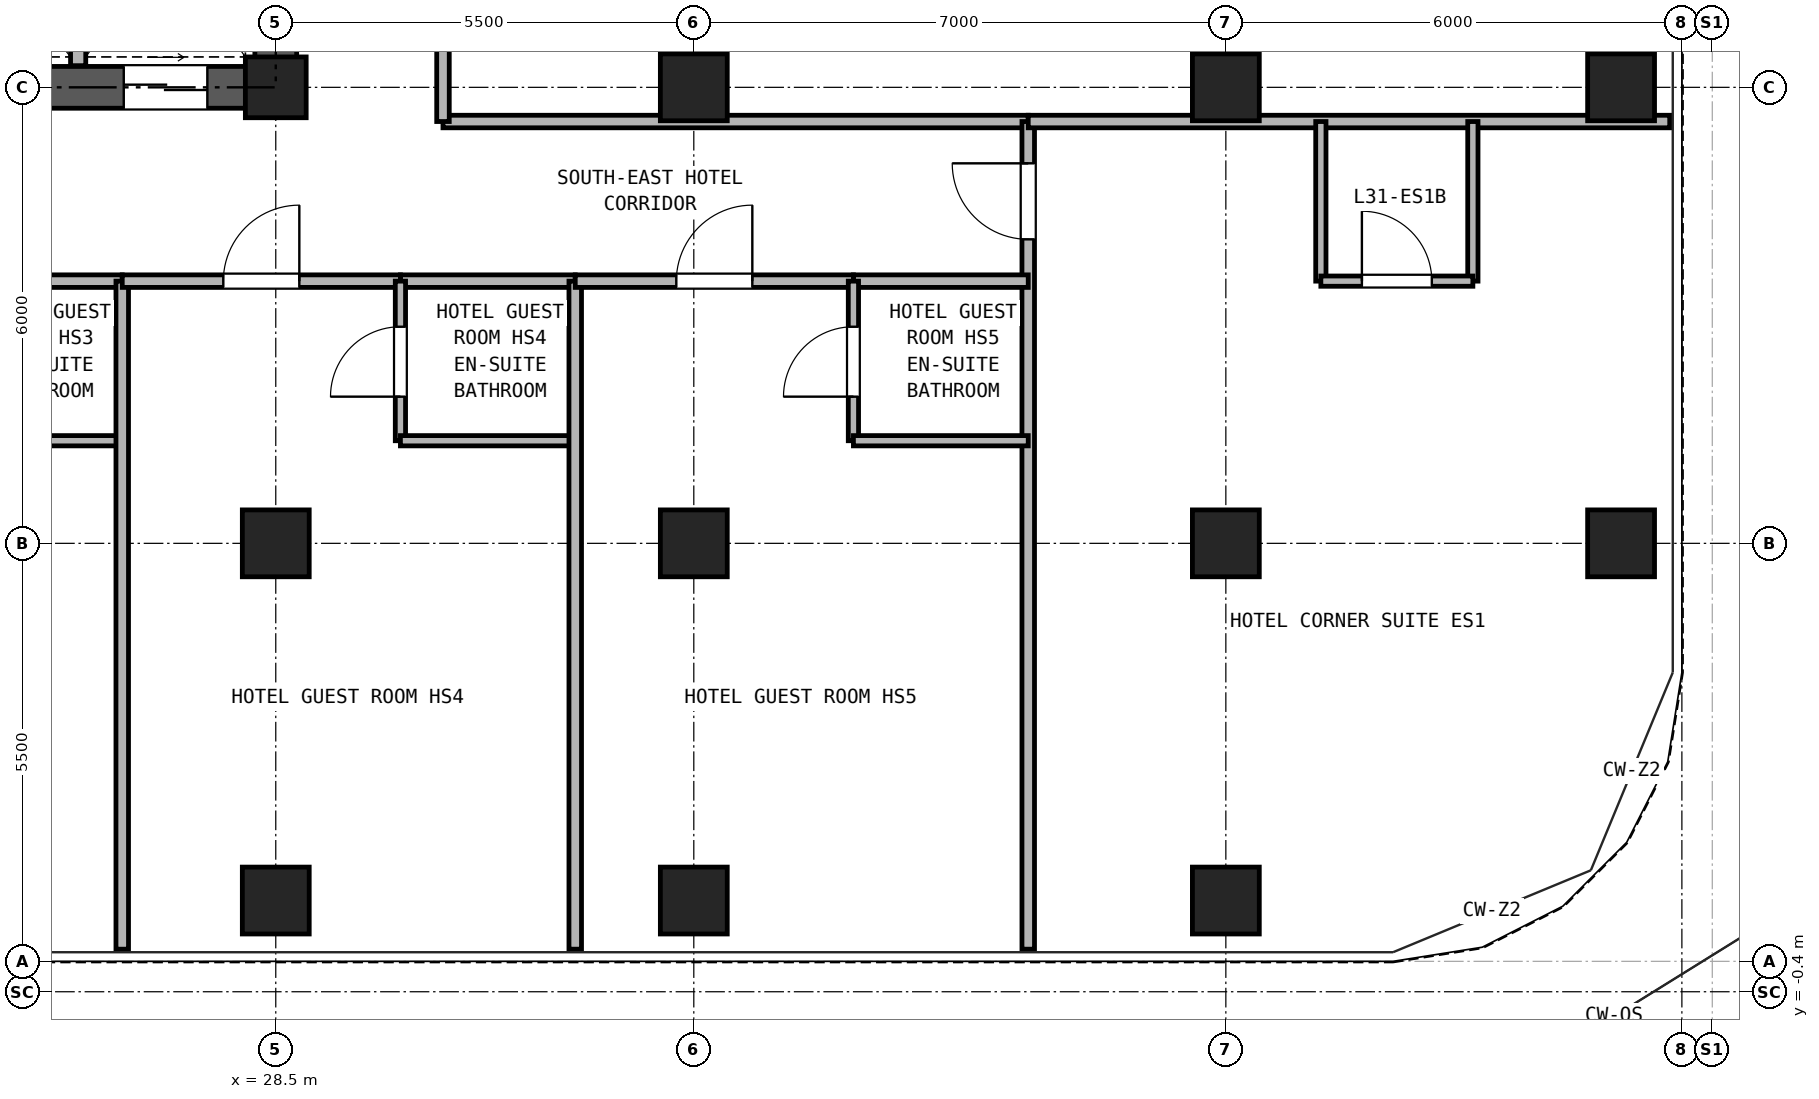
"""IFC4 building model, lengths in metres.
Left out: names, types, materials, properties, quantities, classifications, styles, units other than length and angle.
Written with IfcOpenShell. Run it as: python <this file> out.ifc"""

import sys

from ifc_helpers import new_model, si_unit, direction, frame, frame_2d, origin, origin_2d, place, context, subcontext, project, spatial, rectangle, hollow_rectangle, extrude, source, transform, mapped, element, fill, save


model = new_model("IFC4")
c1 = context("Model", 3, precision=1e-05, world=origin(), true_north=direction((0.0, 1.0)))
c2 = subcontext(c1, "Body", "Model", "MODEL_VIEW")
j1 = project(units=[si_unit("LENGTHUNIT", "METRE"), si_unit("PLANEANGLEUNIT", "RADIAN")], contexts=[c1])
p1 = place(None, origin())
s1 = spatial("IfcSite", under=j1, at=p1, CompositionType="ELEMENT")
p2 = place(p1, origin())
s2 = spatial("IfcBuilding", under=s1, at=p2, CompositionType="ELEMENT")
p3 = place(p2, frame((0.0, 0.0, 115.1)))
s3 = spatial("IfcBuildingStorey", under=s2, at=p3, CompositionType="ELEMENT", Elevation=115.1)
m1 = source(origin(), c2, "Body", "SweptSolid", [
    extrude(hollow_rectangle(XDim=0.88, YDim=0.88, WallThickness=0.05, at=origin_2d()), origin(), (0.0, 0.0, 1.0), 2.95),
])
for number, where, z_axis, x_axis in (
    (1, (28.5, 0.8, 0.0), (0.0, 0.0, 1.0), (1.0, 0.0, 0.0)),
    (2, (34.0, 0.8, 0.0), (0.0, 0.0, 1.0), (1.0, 0.0, 0.0)),
    (3, (41.0, 0.8, 0.0), (0.0, 0.0, 1.0), (1.0, 0.0, 0.0)),
    (4, (46.2, 5.5, 0.0), (0.0, 0.0, 1.0), (1.0, 0.0, 0.0)),
    (5, (46.2, 11.5, 0.0), (0.0, 0.0, 1.0), (1.0, 0.0, 0.0)),
    (6, (28.5, 5.5, 0.0), (0.0, 0.0, 1.0), (1.0, 0.0, 0.0)),
):
    element("IfcColumn", number, at=place(p3, frame(where, z_axis=z_axis, x_axis=x_axis)), inside=s3, PredefinedType="COLUMN", context=c2, shape_type="MappedRepresentation", body=[
        mapped(m1, transform((0.0, 0.0, 0.0), x_axis=(1.0, 0.0, 0.0), y_axis=(0.0, 1.0, 0.0), z_axis=(0.0, 0.0, 1.0), scale=1.0)),
    ])
m2 = source(origin(), c2, "Body", "SweptSolid", [
    extrude(hollow_rectangle(XDim=0.8, YDim=0.8, WallThickness=0.045, at=origin_2d()), origin(), (0.0, 0.0, 1.0), 2.95),
])
p4 = place(p3, frame((28.5, 11.5, 0.0), z_axis=(0.0, 0.0, 1.0), x_axis=(1.0, 0.0, 0.0)))
e7 = element("IfcColumn", 7, at=p4, inside=s3, PredefinedType="COLUMN", context=c2, shape_type="MappedRepresentation", body=[
    mapped(m2, transform((0.0, 0.0, 0.0), x_axis=(1.0, 0.0, 0.0), y_axis=(0.0, 1.0, 0.0), z_axis=(0.0, 0.0, 1.0), scale=1.0)),
])
for number, where, z_axis, x_axis in (
    (8, (34.0, 5.5, 0.0), (0.0, 0.0, 1.0), (1.0, 0.0, 0.0)),
    (9, (34.0, 11.5, 0.0), (0.0, 0.0, 1.0), (1.0, 0.0, 0.0)),
    (10, (41.0, 5.5, 0.0), (0.0, 0.0, 1.0), (1.0, 0.0, 0.0)),
    (11, (41.0, 11.5, 0.0), (0.0, 0.0, 1.0), (1.0, 0.0, 0.0)),
):
    element("IfcColumn", number, at=place(p3, frame(where, z_axis=z_axis, x_axis=x_axis)), inside=s3, PredefinedType="COLUMN", context=c2, shape_type="MappedRepresentation", body=[
        mapped(m1, transform((0.0, 0.0, 0.0), x_axis=(1.0, 0.0, 0.0), y_axis=(0.0, 1.0, 0.0), z_axis=(0.0, 0.0, 1.0), scale=1.0)),
    ])
p5 = place(p3, frame((18.225, 11.5, 0.0), z_axis=(0.0, 0.0, 1.0), x_axis=(1.0, 0.0, 0.0)))
e12 = element("IfcWall", 12, at=p5, inside=s3, PredefinedType="SHEAR", context=c2, shape_type="SweptSolid", body=[
    extrude(rectangle(XDim=10.55, YDim=0.55, at=frame_2d((5.275, 0.0))), origin(), (0.0, 0.0, 1.0), 2.95),
])
p6 = place(p5, frame((2.375, 0.0, 0.0)))
e13 = element("IfcOpeningElement", 13, at=p6, cuts=e12, PredefinedType="OPENING", context=c2, shape_type="SweptSolid", body=[
    extrude(rectangle(XDim=0.95, YDim=2.15, at=frame_2d((0.475, 1.075))), frame((0.0, 0.285, 0.0), z_axis=(0.0, -1.0, 0.0), x_axis=(1.0, 0.0, 0.0)), (0.0, 0.0, 1.0), 0.57),
])
p7 = place(p5, frame((5.875, 0.0, 0.0)))
e14 = element("IfcOpeningElement", 14, at=p7, cuts=e12, PredefinedType="OPENING", context=c2, shape_type="SweptSolid", body=[
    extrude(rectangle(XDim=1.1, YDim=2.25, at=frame_2d((0.55, 1.125))), frame((0.0, 0.285, 0.0), z_axis=(0.0, -1.0, 0.0), x_axis=(1.0, 0.0, 0.0)), (0.0, 0.0, 1.0), 0.57),
])
p8 = place(p5, frame((8.275, 0.0, 0.0)))
e15 = element("IfcOpeningElement", 15, at=p8, cuts=e12, PredefinedType="OPENING", context=c2, shape_type="SweptSolid", body=[
    extrude(rectangle(XDim=1.1, YDim=2.25, at=frame_2d((0.55, 1.125))), frame((0.0, 0.285, 0.0), z_axis=(0.0, -1.0, 0.0), x_axis=(1.0, 0.0, 0.0)), (0.0, 0.0, 1.0), 0.57),
])
p9 = place(p3, frame((28.5, 11.775, 0.0), z_axis=(0.0, 0.0, 1.0), x_axis=(0.0, 1.0, 0.0)))
e16 = element("IfcWall", 16, at=p9, inside=s3, PredefinedType="SHEAR", context=c2, shape_type="SweptSolid", body=[
    extrude(rectangle(XDim=16.7, YDim=0.55, at=frame_2d((8.35, 0.0))), origin(), (0.0, 0.0, 1.0), 2.95),
])
p10 = place(p9, frame((7.375, 0.0, 0.0)))
e17 = element("IfcOpeningElement", 17, at=p10, cuts=e16, PredefinedType="OPENING", context=c2, shape_type="SweptSolid", body=[
    extrude(rectangle(XDim=1.15, YDim=2.2, at=frame_2d((0.575, 1.1))), frame((0.0, 0.285, 0.0), z_axis=(0.0, -1.0, 0.0), x_axis=(1.0, 0.0, 0.0)), (0.0, 0.0, 1.0), 0.57),
])
p11 = place(p3, frame((25.9, 11.785, 0.0), z_axis=(0.0, 0.0, 1.0), x_axis=(0.0, 1.0, 0.0)))
e18 = element("IfcWall", 18, at=p11, inside=s3, PredefinedType="PARTITIONING", context=c2, shape_type="SweptSolid", body=[
    extrude(rectangle(XDim=3.215, YDim=0.2, at=frame_2d((1.607, 0.0))), origin(), (0.0, 0.0, 1.0), 2.95),
])
p12 = place(p3, frame((30.7, 11.05, 0.0), z_axis=(0.0, 0.0, 1.0), x_axis=(1.0, 0.0, 0.0)))
e19 = element("IfcWall", 19, at=p12, inside=s3, PredefinedType="PARTITIONING", context=c2, shape_type="SweptSolid", body=[
    extrude(rectangle(XDim=7.7, YDim=0.165, at=frame_2d((3.85, 0.0))), origin(), (0.0, 0.0, 1.0), 2.95),
])
p13 = place(p3, frame((30.7, 11.05, 0.0), z_axis=(0.0, 0.0, 1.0), x_axis=(0.0, 1.0, 0.0)))
e20 = element("IfcWall", 20, at=p13, inside=s3, PredefinedType="PARTITIONING", context=c2, shape_type="SweptSolid", body=[
    extrude(rectangle(XDim=18.15, YDim=0.165, at=frame_2d((9.075, 0.0))), origin(), (0.0, 0.0, 1.0), 2.95),
])
p14 = place(p13, frame((8.575, 0.0, 0.0)))
e21 = element("IfcOpeningElement", 21, at=p14, cuts=e20, PredefinedType="OPENING", context=c2, shape_type="SweptSolid", body=[
    extrude(rectangle(XDim=0.95, YDim=2.15, at=frame_2d((0.475, 1.075))), frame((0.0, 0.093, 0.0), z_axis=(0.0, -1.0, 0.0), x_axis=(1.0, 0.0, 0.0)), (0.0, 0.0, 1.0), 0.185),
])
p15 = place(p3, frame((38.4, 0.16, 0.0), z_axis=(0.0, 0.0, 1.0), x_axis=(0.0, 1.0, 0.0)))
e22 = element("IfcWall", 22, at=p15, inside=s3, PredefinedType="PARTITIONING", context=c2, shape_type="SweptSolid", body=[
    extrude(rectangle(XDim=10.89, YDim=0.165, at=frame_2d((5.445, 0.0))), origin(), (0.0, 0.0, 1.0), 2.95),
])
p16 = place(p15, frame((9.34, 0.0, 0.0)))
e23 = element("IfcOpeningElement", 23, at=p16, cuts=e22, PredefinedType="OPENING", context=c2, shape_type="SweptSolid", body=[
    extrude(rectangle(XDim=1.0, YDim=2.15, at=frame_2d((0.5, 1.075))), frame((0.0, 0.093, 0.0), z_axis=(0.0, -1.0, 0.0), x_axis=(1.0, 0.0, 0.0)), (0.0, 0.0, 1.0), 0.185),
])
p17 = place(p3, frame((38.4, 11.05, 0.0), z_axis=(0.0, 0.0, 1.0), x_axis=(1.0, 0.0, 0.0)))
e24 = element("IfcWall", 24, at=p17, inside=s3, PredefinedType="PARTITIONING", context=c2, shape_type="SweptSolid", body=[
    extrude(rectangle(XDim=8.44, YDim=0.165, at=frame_2d((4.22, 0.0))), origin(), (0.0, 0.0, 1.0), 2.95),
])
for number, where, z_axis, x_axis in (
    (25, (42.25, 8.95, 0.0), (0.0, 0.0, 1.0), (0.0, 1.0, 0.0)),
    (26, (44.25, 8.95, 0.0), (0.0, 0.0, 1.0), (0.0, 1.0, 0.0)),
):
    element("IfcWall", number, at=place(p3, frame(where, z_axis=z_axis, x_axis=x_axis)), inside=s3, PredefinedType="PARTITIONING", context=c2, shape_type="SweptSolid", body=[
        extrude(rectangle(XDim=2.1, YDim=0.135, at=frame_2d((1.05, 0.0))), origin(), (0.0, 0.0, 1.0), 2.95),
    ])
p18 = place(p3, frame((42.25, 8.95, 0.0), z_axis=(0.0, 0.0, 1.0), x_axis=(1.0, 0.0, 0.0)))
e27 = element("IfcWall", 27, at=p18, inside=s3, PredefinedType="PARTITIONING", context=c2, shape_type="SweptSolid", body=[
    extrude(rectangle(XDim=2.0, YDim=0.135, at=frame_2d((1.0, 0.0))), origin(), (0.0, 0.0, 1.0), 2.95),
])
p19 = place(p18, frame((0.54, 0.0, 0.0)))
e28 = element("IfcOpeningElement", 28, at=p19, cuts=e27, PredefinedType="OPENING", context=c2, shape_type="SweptSolid", body=[
    extrude(rectangle(XDim=0.92, YDim=2.1, at=frame_2d((0.46, 1.05))), frame((0.0, 0.077, 0.0), z_axis=(0.0, -1.0, 0.0), x_axis=(1.0, 0.0, 0.0)), (0.0, 0.0, 1.0), 0.155),
])
p20 = place(p3, frame((24.18, 8.95, 0.0), z_axis=(0.0, 0.0, 1.0), x_axis=(1.0, 0.0, 0.0)))
e29 = element("IfcWall", 29, at=p20, inside=s3, PredefinedType="PARTITIONING", context=c2, shape_type="SweptSolid", body=[
    extrude(rectangle(XDim=2.3, YDim=0.165, at=frame_2d((1.15, 0.0))), origin(), (0.0, 0.0, 1.0), 2.95),
])
p21 = place(p3, frame((24.18, 6.85, 0.0), z_axis=(0.0, 0.0, 1.0), x_axis=(1.0, 0.0, 0.0)))
e30 = element("IfcWall", 30, at=p21, inside=s3, PredefinedType="PARTITIONING", context=c2, shape_type="SweptSolid", body=[
    extrude(rectangle(XDim=2.3, YDim=0.135, at=frame_2d((1.15, 0.0))), origin(), (0.0, 0.0, 1.0), 2.95),
])
p22 = place(p3, frame((26.48, 0.16, 0.0), z_axis=(0.0, 0.0, 1.0), x_axis=(0.0, 1.0, 0.0)))
e31 = element("IfcWall", 31, at=p22, inside=s3, PredefinedType="PARTITIONING", context=c2, shape_type="SweptSolid", body=[
    extrude(rectangle(XDim=8.79, YDim=0.165, at=frame_2d((4.395, 0.0))), origin(), (0.0, 0.0, 1.0), 2.95),
])
p23 = place(p3, frame((30.14, 8.95, 0.0), z_axis=(0.0, 0.0, 1.0), x_axis=(1.0, 0.0, 0.0)))
e32 = element("IfcWall", 32, at=p23, inside=s3, PredefinedType="PARTITIONING", context=c2, shape_type="SweptSolid", body=[
    extrude(rectangle(XDim=2.3, YDim=0.165, at=frame_2d((1.15, 0.0))), origin(), (0.0, 0.0, 1.0), 2.95),
])
p24 = place(p3, frame((26.48, 8.95, 0.0), z_axis=(0.0, 0.0, 1.0), x_axis=(1.0, 0.0, 0.0)))
e33 = element("IfcWall", 33, at=p24, inside=s3, PredefinedType="PARTITIONING", context=c2, shape_type="SweptSolid", body=[
    extrude(rectangle(XDim=3.66, YDim=0.165, at=frame_2d((1.83, 0.0))), origin(), (0.0, 0.0, 1.0), 2.95),
])
p25 = place(p24, frame((1.33, 0.0, 0.0)))
e34 = element("IfcOpeningElement", 34, at=p25, cuts=e33, PredefinedType="OPENING", context=c2, shape_type="SweptSolid", body=[
    extrude(rectangle(XDim=1.0, YDim=2.15, at=frame_2d((0.5, 1.075))), frame((0.0, 0.093, 0.0), z_axis=(0.0, -1.0, 0.0), x_axis=(1.0, 0.0, 0.0)), (0.0, 0.0, 1.0), 0.185),
])
p26 = place(p3, frame((30.14, 6.85, 0.0), z_axis=(0.0, 0.0, 1.0), x_axis=(0.0, 1.0, 0.0)))
e35 = element("IfcWall", 35, at=p26, inside=s3, PredefinedType="PARTITIONING", context=c2, shape_type="SweptSolid", body=[
    extrude(rectangle(XDim=2.1, YDim=0.135, at=frame_2d((1.05, 0.0))), origin(), (0.0, 0.0, 1.0), 2.95),
])
p27 = place(p26, frame((0.58, 0.0, 0.0)))
e36 = element("IfcOpeningElement", 36, at=p27, cuts=e35, PredefinedType="OPENING", context=c2, shape_type="SweptSolid", body=[
    extrude(rectangle(XDim=0.92, YDim=2.1, at=frame_2d((0.46, 1.05))), frame((0.0, 0.077, 0.0), z_axis=(0.0, -1.0, 0.0), x_axis=(1.0, 0.0, 0.0)), (0.0, 0.0, 1.0), 0.155),
])
p28 = place(p3, frame((30.14, 6.85, 0.0), z_axis=(0.0, 0.0, 1.0), x_axis=(1.0, 0.0, 0.0)))
e37 = element("IfcWall", 37, at=p28, inside=s3, PredefinedType="PARTITIONING", context=c2, shape_type="SweptSolid", body=[
    extrude(rectangle(XDim=2.3, YDim=0.135, at=frame_2d((1.15, 0.0))), origin(), (0.0, 0.0, 1.0), 2.95),
])
p29 = place(p3, frame((32.44, 0.16, 0.0), z_axis=(0.0, 0.0, 1.0), x_axis=(0.0, 1.0, 0.0)))
e38 = element("IfcWall", 38, at=p29, inside=s3, PredefinedType="PARTITIONING", context=c2, shape_type="SweptSolid", body=[
    extrude(rectangle(XDim=8.79, YDim=0.165, at=frame_2d((4.395, 0.0))), origin(), (0.0, 0.0, 1.0), 2.95),
])
p30 = place(p3, frame((36.1, 8.95, 0.0), z_axis=(0.0, 0.0, 1.0), x_axis=(1.0, 0.0, 0.0)))
e39 = element("IfcWall", 39, at=p30, inside=s3, PredefinedType="PARTITIONING", context=c2, shape_type="SweptSolid", body=[
    extrude(rectangle(XDim=2.3, YDim=0.165, at=frame_2d((1.15, 0.0))), origin(), (0.0, 0.0, 1.0), 2.95),
])
p31 = place(p3, frame((32.44, 8.95, 0.0), z_axis=(0.0, 0.0, 1.0), x_axis=(1.0, 0.0, 0.0)))
e40 = element("IfcWall", 40, at=p31, inside=s3, PredefinedType="PARTITIONING", context=c2, shape_type="SweptSolid", body=[
    extrude(rectangle(XDim=3.66, YDim=0.165, at=frame_2d((1.83, 0.0))), origin(), (0.0, 0.0, 1.0), 2.95),
])
p32 = place(p31, frame((1.33, 0.0, 0.0)))
e41 = element("IfcOpeningElement", 41, at=p32, cuts=e40, PredefinedType="OPENING", context=c2, shape_type="SweptSolid", body=[
    extrude(rectangle(XDim=1.0, YDim=2.15, at=frame_2d((0.5, 1.075))), frame((0.0, 0.093, 0.0), z_axis=(0.0, -1.0, 0.0), x_axis=(1.0, 0.0, 0.0)), (0.0, 0.0, 1.0), 0.185),
])
p33 = place(p3, frame((36.1, 6.85, 0.0), z_axis=(0.0, 0.0, 1.0), x_axis=(0.0, 1.0, 0.0)))
e42 = element("IfcWall", 42, at=p33, inside=s3, PredefinedType="PARTITIONING", context=c2, shape_type="SweptSolid", body=[
    extrude(rectangle(XDim=2.1, YDim=0.135, at=frame_2d((1.05, 0.0))), origin(), (0.0, 0.0, 1.0), 2.95),
])
p34 = place(p33, frame((0.58, 0.0, 0.0)))
e43 = element("IfcOpeningElement", 43, at=p34, cuts=e42, PredefinedType="OPENING", context=c2, shape_type="SweptSolid", body=[
    extrude(rectangle(XDim=0.92, YDim=2.1, at=frame_2d((0.46, 1.05))), frame((0.0, 0.077, 0.0), z_axis=(0.0, -1.0, 0.0), x_axis=(1.0, 0.0, 0.0)), (0.0, 0.0, 1.0), 0.155),
])
p35 = place(p3, frame((36.1, 6.85, 0.0), z_axis=(0.0, 0.0, 1.0), x_axis=(1.0, 0.0, 0.0)))
e44 = element("IfcWall", 44, at=p35, inside=s3, PredefinedType="PARTITIONING", context=c2, shape_type="SweptSolid", body=[
    extrude(rectangle(XDim=2.3, YDim=0.135, at=frame_2d((1.15, 0.0))), origin(), (0.0, 0.0, 1.0), 2.95),
])
p36 = place(p8, frame((1.1, 0.0, 0.0), z_axis=(0.0, 0.0, 1.0), x_axis=(-1.0, 0.0, 0.0)))
e45 = element("IfcDoor", 45, at=p36, inside=s3, OperationType="DOUBLE_DOOR_SLIDING", PredefinedType="DOOR", context=c2, shape_type="SweptSolid", body=[
    extrude(rectangle(XDim=1.1, YDim=2.25, at=frame_2d((0.55, 1.125))), frame((0.0, 0.025, 0.0), z_axis=(0.0, -1.0, 0.0), x_axis=(1.0, 0.0, 0.0)), (0.0, 0.0, 1.0), 0.05),
])
fill(e15, e45)
p37 = place(p19, origin())
e46 = element("IfcDoor", 46, at=p37, inside=s3, OperationType="SINGLE_SWING_LEFT", PredefinedType="DOOR", context=c2, shape_type="SweptSolid", body=[
    extrude(rectangle(XDim=0.92, YDim=2.1, at=frame_2d((0.46, 1.05))), frame((0.0, 0.025, 0.0), z_axis=(0.0, -1.0, 0.0), x_axis=(1.0, 0.0, 0.0)), (0.0, 0.0, 1.0), 0.05),
])
fill(e28, e46)
p38 = place(p16, frame((1.0, 0.0, 0.0), z_axis=(0.0, 0.0, 1.0), x_axis=(-1.0, 0.0, 0.0)))
e47 = element("IfcDoor", 47, at=p38, inside=s3, OperationType="SINGLE_SWING_RIGHT", PredefinedType="DOOR", context=c2, shape_type="SweptSolid", body=[
    extrude(rectangle(XDim=1.0, YDim=2.15, at=frame_2d((0.5, 1.075))), frame((0.0, 0.025, 0.0), z_axis=(0.0, -1.0, 0.0), x_axis=(1.0, 0.0, 0.0)), (0.0, 0.0, 1.0), 0.05),
])
fill(e23, e47)
p39 = place(p27, origin())
e48 = element("IfcDoor", 48, at=p39, inside=s3, OperationType="SINGLE_SWING_LEFT", PredefinedType="DOOR", context=c2, shape_type="SweptSolid", body=[
    extrude(rectangle(XDim=0.92, YDim=2.1, at=frame_2d((0.46, 1.05))), frame((0.0, 0.025, 0.0), z_axis=(0.0, -1.0, 0.0), x_axis=(1.0, 0.0, 0.0)), (0.0, 0.0, 1.0), 0.05),
])
fill(e36, e48)
p40 = place(p25, frame((1.0, 0.0, 0.0), z_axis=(0.0, 0.0, 1.0), x_axis=(-1.0, 0.0, 0.0)))
e49 = element("IfcDoor", 49, at=p40, inside=s3, OperationType="SINGLE_SWING_RIGHT", PredefinedType="DOOR", context=c2, shape_type="SweptSolid", body=[
    extrude(rectangle(XDim=1.0, YDim=2.15, at=frame_2d((0.5, 1.075))), frame((0.0, 0.025, 0.0), z_axis=(0.0, -1.0, 0.0), x_axis=(1.0, 0.0, 0.0)), (0.0, 0.0, 1.0), 0.05),
])
fill(e34, e49)
p41 = place(p34, origin())
e50 = element("IfcDoor", 50, at=p41, inside=s3, OperationType="SINGLE_SWING_LEFT", PredefinedType="DOOR", context=c2, shape_type="SweptSolid", body=[
    extrude(rectangle(XDim=0.92, YDim=2.1, at=frame_2d((0.46, 1.05))), frame((0.0, 0.025, 0.0), z_axis=(0.0, -1.0, 0.0), x_axis=(1.0, 0.0, 0.0)), (0.0, 0.0, 1.0), 0.05),
])
fill(e43, e50)
p42 = place(p32, frame((1.0, 0.0, 0.0), z_axis=(0.0, 0.0, 1.0), x_axis=(-1.0, 0.0, 0.0)))
e51 = element("IfcDoor", 51, at=p42, inside=s3, OperationType="SINGLE_SWING_RIGHT", PredefinedType="DOOR", context=c2, shape_type="SweptSolid", body=[
    extrude(rectangle(XDim=1.0, YDim=2.15, at=frame_2d((0.5, 1.075))), frame((0.0, 0.025, 0.0), z_axis=(0.0, -1.0, 0.0), x_axis=(1.0, 0.0, 0.0)), (0.0, 0.0, 1.0), 0.05),
])
fill(e41, e51)
save(model, sys.argv[1])
